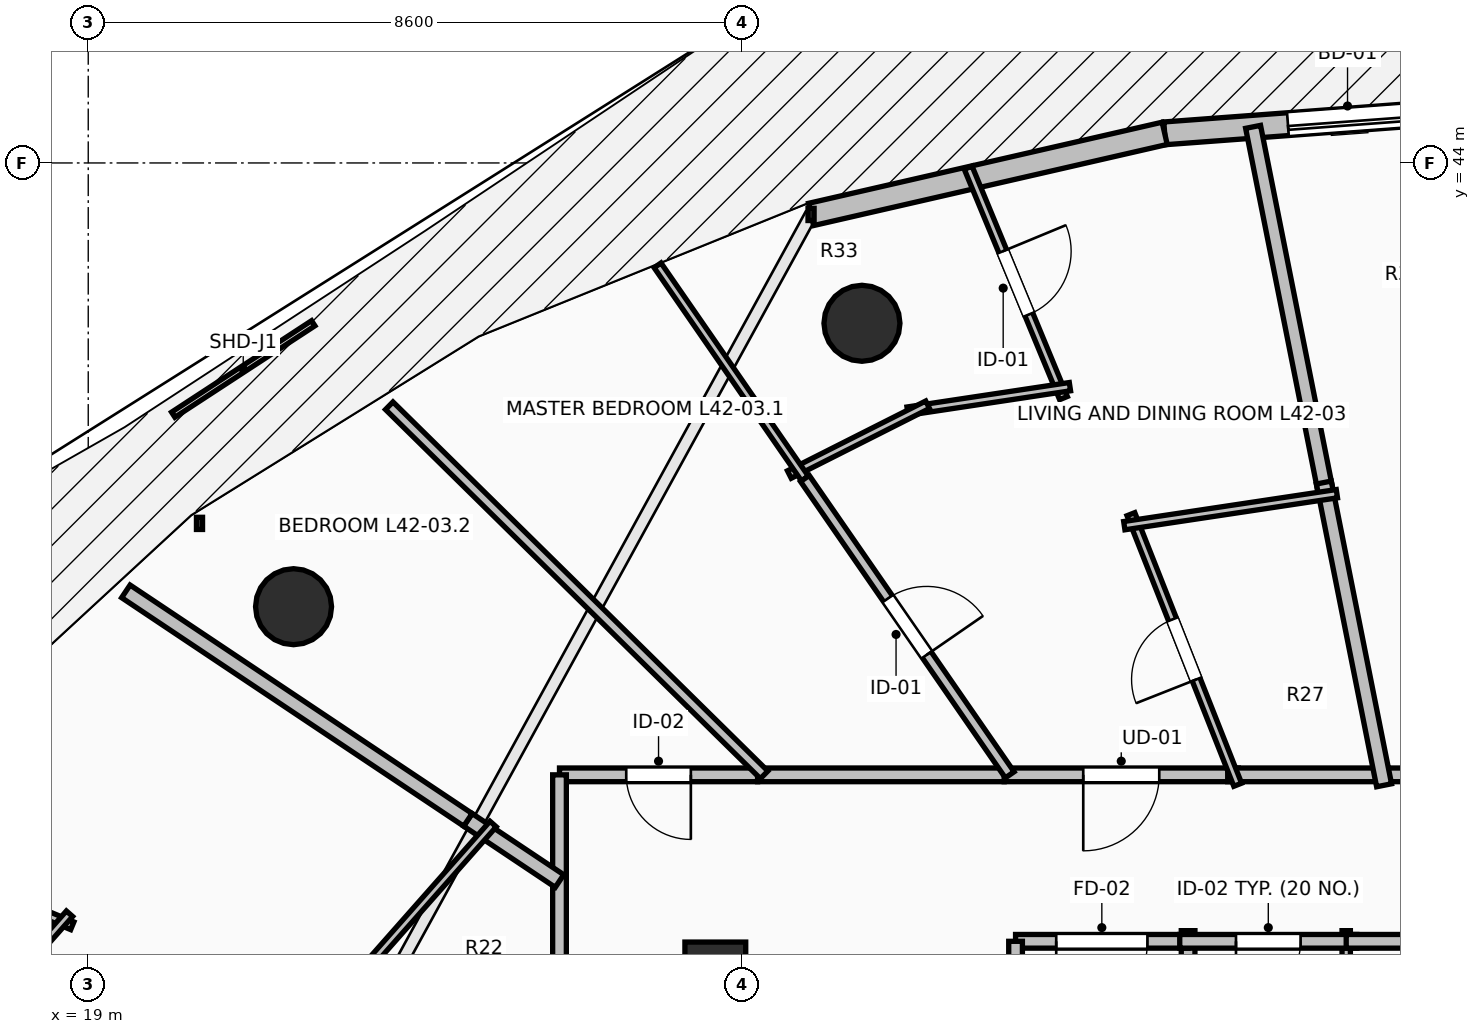
"""IFC4 building model, lengths in metres.
Left out: names, types, materials, properties, quantities, classifications, styles, units other than length and angle.
Written with IfcOpenShell. Run it as: python <this file> out.ifc"""

import sys

from ifc_helpers import new_model, si_unit, direction, frame, frame_2d, origin, origin_2d, place, context, subcontext, project, spatial, rectangle, circle, extrude, element, fill, save


model = new_model("IFC4")
c1 = context("Model", 3, precision=1e-05, world=origin(), true_north=direction((0.0, 1.0)))
c2 = subcontext(c1, "Body", "Model", "MODEL_VIEW")
j1 = project(units=[si_unit("LENGTHUNIT", "METRE"), si_unit("PLANEANGLEUNIT", "RADIAN")], contexts=[c1])
p1 = place(None, origin())
s1 = spatial("IfcSite", under=j1, at=p1, CompositionType="ELEMENT")
p2 = place(p1, origin())
s2 = spatial("IfcBuilding", under=s1, at=p2, CompositionType="ELEMENT")
p3 = place(p2, frame((0.0, 0.0, 157.1)))
s3 = spatial("IfcBuildingStorey", under=s2, at=p3, CompositionType="ELEMENT", Elevation=157.1)
for number, where, z_axis, x_axis in (
    (1, (29.179, 41.891, 0.0), (0.0, 0.0, 1.0), (-0.383, 0.924, 0.0)),
    (2, (21.701, 38.162, 0.0), (0.0, 0.0, 1.0), (-0.707, 0.707, 0.0)),
):
    element("IfcColumn", number, at=place(p3, frame(where, z_axis=z_axis, x_axis=x_axis)), inside=s3, PredefinedType="COLUMN", context=c2, shape_type="SweptSolid", body=[
        extrude(circle(Radius=0.5, at=origin_2d()), origin(), (0.0, 0.0, 1.0), 3.5),
    ])
p4 = place(p3, frame((27.25, 33.15, 0.0), z_axis=(0.0, 0.0, 1.0), x_axis=(1.0, 0.0, 0.0)))
e3 = element("IfcColumn", 3, at=p4, inside=s3, PredefinedType="PILASTER", context=c2, shape_type="SweptSolid", body=[
    extrude(rectangle(XDim=0.8, YDim=1.2, at=origin_2d()), origin(), (0.0, 0.0, 1.0), 3.5),
])
p5 = place(p3, frame((38.0, 44.75, 0.0), z_axis=(0.0, 0.0, 1.0), x_axis=(-0.997237740067, -0.074275768499, 0.0)))
e4 = element("IfcWall", 4, at=p5, inside=s3, PredefinedType="STANDARD", context=c2, shape_type="SweptSolid", body=[
    extrude(rectangle(XDim=4.852, YDim=0.3, at=frame_2d((2.426, 0.0))), origin(), (0.0, 0.0, 1.0), 3.24),
])
p6 = place(p5, frame((1.626, 0.0, 0.0)))
e5 = element("IfcOpeningElement", 5, at=p6, cuts=e4, PredefinedType="OPENING", context=c2, shape_type="SweptSolid", body=[
    extrude(rectangle(XDim=1.6, YDim=2.3, at=frame_2d((0.8, 1.15))), frame((0.0, 0.165, 0.0), z_axis=(0.0, -1.0, 0.0), x_axis=(1.0, 0.0, 0.0)), (0.0, 0.0, 1.0), 0.33),
])
p7 = place(p3, frame((33.162, 44.39, 0.0), z_axis=(0.0, 0.0, 1.0), x_axis=(-0.974698897188, -0.223521944832, 0.0)))
e6 = element("IfcWall", 6, at=p7, inside=s3, PredefinedType="STANDARD", context=c2, shape_type="SweptSolid", body=[
    extrude(rectangle(XDim=4.773, YDim=0.3, at=frame_2d((2.387, 0.0))), origin(), (0.0, 0.0, 1.0), 3.24),
])
p8 = place(p3, frame((33.47, 30.34, 0.0), z_axis=(0.0, 0.0, 1.0), x_axis=(0.0, 1.0, 0.0)))
e7 = element("IfcWall", 7, at=p8, inside=s3, PredefinedType="PARTITIONING", context=c2, shape_type="SweptSolid", body=[
    extrude(rectangle(XDim=3.56, YDim=0.18, at=frame_2d((1.78, 0.0))), origin(), (0.0, 0.0, 1.0), 3.24),
])
p9 = place(p3, frame((33.47, 33.76, 0.0), z_axis=(0.0, 0.0, 1.0), x_axis=(-1.0, 0.0, 0.0)))
e8 = element("IfcWall", 8, at=p9, inside=s3, PredefinedType="PARTITIONING", context=c2, shape_type="SweptSolid", body=[
    extrude(rectangle(XDim=2.27, YDim=0.18, at=frame_2d((1.135, 0.0))), origin(), (0.0, 0.0, 1.0), 3.24),
])
p10 = place(p9, frame((0.535, 0.0, 0.0)))
e9 = element("IfcOpeningElement", 9, at=p10, cuts=e8, PredefinedType="OPENING", context=c2, shape_type="SweptSolid", body=[
    extrude(rectangle(XDim=1.2, YDim=2.15, at=frame_2d((0.6, 1.075))), frame((0.0, 0.105, 0.0), z_axis=(0.0, -1.0, 0.0), x_axis=(1.0, 0.0, 0.0)), (0.0, 0.0, 1.0), 0.21),
])
p11 = place(p3, frame((31.2, 33.76, 0.0), z_axis=(0.0, 0.0, 1.0), x_axis=(0.0, -1.0, 0.0)))
e10 = element("IfcWall", 10, at=p11, inside=s3, PredefinedType="PARTITIONING", context=c2, shape_type="SweptSolid", body=[
    extrude(rectangle(XDim=0.56, YDim=0.18, at=frame_2d((0.28, 0.0))), origin(), (0.0, 0.0, 1.0), 3.24),
])
p12 = place(p3, frame((35.55, 30.34, 0.0), z_axis=(0.0, 0.0, 1.0), x_axis=(0.0, 1.0, 0.0)))
e11 = element("IfcWall", 11, at=p12, inside=s3, PredefinedType="PARTITIONING", context=c2, shape_type="SweptSolid", body=[
    extrude(rectangle(XDim=3.56, YDim=0.11, at=frame_2d((1.78, 0.0))), origin(), (0.0, 0.0, 1.0), 2.432),
])
p13 = place(p3, frame((35.69, 33.76, 0.0), z_axis=(0.0, 0.0, 1.0), x_axis=(-1.0, 0.0, 0.0)))
e12 = element("IfcWall", 12, at=p13, inside=s3, PredefinedType="PARTITIONING", context=c2, shape_type="SweptSolid", body=[
    extrude(rectangle(XDim=2.33, YDim=0.18, at=frame_2d((1.165, 0.0))), origin(), (0.0, 0.0, 1.0), 3.24),
])
p14 = place(p13, frame((0.74, 0.0, 0.0)))
e13 = element("IfcOpeningElement", 13, at=p14, cuts=e12, PredefinedType="OPENING", context=c2, shape_type="SweptSolid", body=[
    extrude(rectangle(XDim=0.85, YDim=2.1, at=frame_2d((0.425, 1.05))), frame((0.0, 0.105, 0.0), z_axis=(0.0, -1.0, 0.0), x_axis=(1.0, 0.0, 0.0)), (0.0, 0.0, 1.0), 0.21),
])
p15 = place(p3, frame((38.29, 33.76, 0.0), z_axis=(0.0, 0.0, 1.0), x_axis=(-1.0, 0.0, 0.0)))
e14 = element("IfcWall", 14, at=p15, inside=s3, PredefinedType="PARTITIONING", context=c2, shape_type="SweptSolid", body=[
    extrude(rectangle(XDim=2.74, YDim=0.18, at=frame_2d((1.37, 0.0))), origin(), (0.0, 0.0, 1.0), 3.24),
])
p16 = place(p15, frame((0.945, 0.0, 0.0)))
e15 = element("IfcOpeningElement", 15, at=p16, cuts=e14, PredefinedType="OPENING", context=c2, shape_type="SweptSolid", body=[
    extrude(rectangle(XDim=0.85, YDim=2.1, at=frame_2d((0.425, 1.05))), frame((0.0, 0.105, 0.0), z_axis=(0.0, -1.0, 0.0), x_axis=(1.0, 0.0, 0.0)), (0.0, 0.0, 1.0), 0.21),
])
p17 = place(p3, frame((37.862, 35.95, 0.0), z_axis=(0.0, 0.0, 1.0), x_axis=(-1.0, 0.0, 0.0)))
e16 = element("IfcWall", 16, at=p17, inside=s3, PredefinedType="PARTITIONING", context=c2, shape_type="SweptSolid", body=[
    extrude(rectangle(XDim=1.902, YDim=0.18, at=frame_2d((0.951, 0.0))), origin(), (0.0, 0.0, 1.0), 2.886),
])
p18 = place(p17, frame((0.526, 0.0, 0.0)))
e17 = element("IfcOpeningElement", 17, at=p18, cuts=e16, PredefinedType="OPENING", context=c2, shape_type="SweptSolid", body=[
    extrude(rectangle(XDim=0.85, YDim=2.1, at=frame_2d((0.425, 1.05))), frame((0.0, 0.105, 0.0), z_axis=(0.0, -1.0, 0.0), x_axis=(1.0, 0.0, 0.0)), (0.0, 0.0, 1.0), 0.21),
])
p19 = place(p3, frame((34.131, 35.95, 0.0), z_axis=(0.0, 0.0, 1.0), x_axis=(-1.0, 0.0, 0.0)))
e18 = element("IfcWall", 18, at=p19, inside=s3, PredefinedType="PARTITIONING", context=c2, shape_type="SweptSolid", body=[
    extrude(rectangle(XDim=3.081, YDim=0.18, at=frame_2d((1.541, 0.0))), origin(), (0.0, 0.0, 1.0), 2.886),
])
p20 = place(p19, frame((1.041, 0.0, 0.0)))
e19 = element("IfcOpeningElement", 19, at=p20, cuts=e18, PredefinedType="OPENING", context=c2, shape_type="SweptSolid", body=[
    extrude(rectangle(XDim=1.0, YDim=2.15, at=frame_2d((0.5, 1.075))), frame((0.0, 0.105, 0.0), z_axis=(0.0, -1.0, 0.0), x_axis=(1.0, 0.0, 0.0)), (0.0, 0.0, 1.0), 0.21),
])
p21 = place(p3, frame((36.1, 35.95, 0.0), z_axis=(0.0, 0.0, 1.0), x_axis=(-1.0, 0.0, 0.0)))
e20 = element("IfcWall", 20, at=p21, inside=s3, PredefinedType="PARTITIONING", context=c2, shape_type="SweptSolid", body=[
    extrude(rectangle(XDim=2.109, YDim=0.18, at=frame_2d((1.055, 0.0))), origin(), (0.0, 0.0, 1.0), 2.886),
])
p22 = place(p3, frame((31.05, 35.95, 0.0), z_axis=(0.0, 0.0, 1.0), x_axis=(-1.0, 0.0, 0.0)))
e21 = element("IfcWall", 21, at=p22, inside=s3, PredefinedType="PARTITIONING", context=c2, shape_type="SweptSolid", body=[
    extrude(rectangle(XDim=3.244, YDim=0.18, at=frame_2d((1.622, 0.0))), origin(), (0.0, 0.0, 1.0), 2.432),
])
p23 = place(p3, frame((27.806, 35.95, 0.0), z_axis=(0.0, 0.0, 1.0), x_axis=(-1.0, 0.0, 0.0)))
e22 = element("IfcWall", 22, at=p23, inside=s3, PredefinedType="PARTITIONING", context=c2, shape_type="SweptSolid", body=[
    extrude(rectangle(XDim=2.606, YDim=0.18, at=frame_2d((1.303, 0.0))), origin(), (0.0, 0.0, 1.0), 2.432),
])
p24 = place(p23, frame((0.878, 0.0, 0.0)))
e23 = element("IfcOpeningElement", 23, at=p24, cuts=e22, PredefinedType="OPENING", context=c2, shape_type="SweptSolid", body=[
    extrude(rectangle(XDim=0.85, YDim=2.1, at=frame_2d((0.425, 1.05))), frame((0.0, 0.105, 0.0), z_axis=(0.0, -1.0, 0.0), x_axis=(1.0, 0.0, 0.0)), (0.0, 0.0, 1.0), 0.21),
])
p25 = place(p3, frame((25.2, 35.95, 0.0), z_axis=(0.0, 0.0, 1.0), x_axis=(0.0, -1.0, 0.0)))
e24 = element("IfcWall", 24, at=p25, inside=s3, PredefinedType="PARTITIONING", context=c2, shape_type="SweptSolid", body=[
    extrude(rectangle(XDim=1.457, YDim=0.18, at=frame_2d((0.729, 0.0))), origin(), (0.0, 0.0, 1.0), 2.432),
])
p26 = place(p3, frame((25.2, 34.633, 0.0), z_axis=(0.0, 0.0, 1.0), x_axis=(0.0, -1.0, 0.0)))
e25 = element("IfcWall", 25, at=p26, inside=s3, PredefinedType="PARTITIONING", context=c2, shape_type="SweptSolid", body=[
    extrude(rectangle(XDim=3.155, YDim=0.18, at=frame_2d((1.578, 0.0))), origin(), (0.0, 0.0, 1.0), 2.432),
])
p27 = place(p3, frame((34.325, 44.475, 0.0), z_axis=(0.0, 0.0, 1.0), x_axis=(0.195054941626, -0.980792317337, 0.0)))
e26 = element("IfcWall", 26, at=p27, inside=s3, PredefinedType="PARTITIONING", context=c2, shape_type="SweptSolid", body=[
    extrude(rectangle(XDim=4.911, YDim=0.2, at=frame_2d((2.456, 0.0))), origin(), (0.0, 0.0, 1.0), 2.432),
])
p28 = place(p3, frame((35.256, 39.795, 0.0), z_axis=(0.0, 0.0, 1.0), x_axis=(0.195214230991, -0.980760625239, 0.0)))
e27 = element("IfcWall", 27, at=p28, inside=s3, PredefinedType="PARTITIONING", context=c2, shape_type="SweptSolid", body=[
    extrude(rectangle(XDim=4.061, YDim=0.2, at=frame_2d((2.03, 0.0))), origin(), (0.0, 0.0, 1.0), 2.886),
])
p29 = place(p3, frame((34.122, 35.82, 0.0), z_axis=(0.0, 0.0, 1.0), x_axis=(-0.36711859649, 0.930174142896, 0.0)))
e28 = element("IfcWall", 28, at=p29, inside=s3, PredefinedType="PARTITIONING", context=c2, shape_type="SweptSolid", body=[
    extrude(rectangle(XDim=3.826, YDim=0.11, at=frame_2d((1.913, 0.0))), origin(), (0.0, 0.0, 1.0), 2.432),
])
p30 = place(p29, frame((1.488, 0.0, 0.0)))
e29 = element("IfcOpeningElement", 29, at=p30, cuts=e28, PredefinedType="OPENING", context=c2, shape_type="SweptSolid", body=[
    extrude(rectangle(XDim=0.85, YDim=2.1, at=frame_2d((0.425, 1.05))), frame((0.0, 0.07, 0.0), z_axis=(0.0, -1.0, 0.0), x_axis=(1.0, 0.0, 0.0)), (0.0, 0.0, 1.0), 0.14),
])
p31 = place(p3, frame((32.631, 39.228, 0.0), z_axis=(0.0, 0.0, 1.0), x_axis=(0.988890718673, 0.148644362566, 0.0)))
e30 = element("IfcWall", 30, at=p31, inside=s3, PredefinedType="PARTITIONING", context=c2, shape_type="SweptSolid", body=[
    extrude(rectangle(XDim=2.828, YDim=0.11, at=frame_2d((1.414, 0.0))), origin(), (0.0, 0.0, 1.0), 2.432),
])
p32 = place(p3, frame((30.576, 43.938, 0.0), z_axis=(0.0, 0.0, 1.0), x_axis=(0.382336453712, -0.924023179451, 0.0)))
e31 = element("IfcWall", 31, at=p32, inside=s3, PredefinedType="PARTITIONING", context=c2, shape_type="SweptSolid", body=[
    extrude(rectangle(XDim=3.28, YDim=0.11, at=frame_2d((1.64, 0.0))), origin(), (0.0, 0.0, 1.0), 2.728),
])
p33 = place(p32, frame((1.19, 0.0, 0.0)))
e32 = element("IfcOpeningElement", 32, at=p33, cuts=e31, PredefinedType="OPENING", context=c2, shape_type="SweptSolid", body=[
    extrude(rectangle(XDim=0.9, YDim=2.1, at=frame_2d((0.45, 1.05))), frame((0.0, 0.07, 0.0), z_axis=(0.0, -1.0, 0.0), x_axis=(1.0, 0.0, 0.0)), (0.0, 0.0, 1.0), 0.14),
])
p34 = place(p3, frame((31.915, 41.057, 0.0), z_axis=(0.0, 0.0, 1.0), x_axis=(-0.98883996758, -0.148981604626, 0.0)))
e33 = element("IfcWall", 33, at=p34, inside=s3, PredefinedType="PARTITIONING", context=c2, shape_type="SweptSolid", body=[
    extrude(rectangle(XDim=2.16, YDim=0.11, at=frame_2d((1.08, 0.0))), origin(), (0.0, 0.0, 1.0), 3.24),
])
p35 = place(p3, frame((30.043, 40.819, 0.0), z_axis=(0.0, 0.0, 1.0), x_axis=(-0.892695055898, -0.450661222179, 0.0)))
e34 = element("IfcWall", 34, at=p35, inside=s3, PredefinedType="PARTITIONING", context=c2, shape_type="SweptSolid", body=[
    extrude(rectangle(XDim=2.038, YDim=0.11, at=frame_2d((1.019, 0.0))), origin(), (0.0, 0.0, 1.0), 2.432),
])
p36 = place(p3, frame((28.429, 39.849, 0.0), z_axis=(0.0, 0.0, 1.0), x_axis=(-0.568554374161, 0.822645685349, 0.0)))
e35 = element("IfcWall", 35, at=p36, inside=s3, PredefinedType="PARTITIONING", context=c2, shape_type="SweptSolid", body=[
    extrude(rectangle(XDim=3.409, YDim=0.11, at=frame_2d((1.705, 0.0))), origin(), (0.0, 0.0, 1.0), 2.728),
])
p37 = place(p3, frame((28.428, 39.849, 0.0), z_axis=(0.0, 0.0, 1.0), x_axis=(0.568542808453, -0.822653678626, 0.0)))
e36 = element("IfcWall", 36, at=p37, inside=s3, PredefinedType="PARTITIONING", context=c2, shape_type="SweptSolid", body=[
    extrude(rectangle(XDim=4.74, YDim=0.14, at=frame_2d((2.37, 0.0))), origin(), (0.0, 0.0, 1.0), 2.432),
])
p38 = place(p37, frame((1.92, 0.0, 0.0)))
e37 = element("IfcOpeningElement", 37, at=p38, cuts=e36, PredefinedType="OPENING", context=c2, shape_type="SweptSolid", body=[
    extrude(rectangle(XDim=0.9, YDim=2.1, at=frame_2d((0.45, 1.05))), frame((0.0, 0.085, 0.0), z_axis=(0.0, -1.0, 0.0), x_axis=(1.0, 0.0, 0.0)), (0.0, 0.0, 1.0), 0.17),
])
p39 = place(p3, frame((22.96, 40.806, 0.0), z_axis=(0.0, 0.0, 1.0), x_axis=(0.712587980465, -0.70158276069, 0.0)))
e38 = element("IfcWall", 38, at=p39, inside=s3, PredefinedType="PARTITIONING", context=c2, shape_type="SweptSolid", body=[
    extrude(rectangle(XDim=6.921, YDim=0.14, at=frame_2d((3.461, 0.0))), origin(), (0.0, 0.0, 1.0), 2.432),
])
p40 = place(p3, frame((23.995, 35.358, 0.0), z_axis=(0.0, 0.0, 1.0), x_axis=(0.831505536539, -0.555516464837, 0.0)))
e39 = element("IfcWall", 39, at=p40, inside=s3, PredefinedType="PARTITIONING", context=c2, shape_type="SweptSolid", body=[
    extrude(rectangle(XDim=1.449, YDim=0.2, at=frame_2d((0.725, 0.0))), origin(), (0.0, 0.0, 1.0), 3.24),
])
p41 = place(p3, frame((19.495, 38.364, 0.0), z_axis=(0.0, 0.0, 1.0), x_axis=(0.831529389247, -0.55548076008, 0.0)))
e40 = element("IfcWall", 40, at=p41, inside=s3, PredefinedType="PARTITIONING", context=c2, shape_type="SweptSolid", body=[
    extrude(rectangle(XDim=5.412, YDim=0.2, at=frame_2d((2.706, 0.0))), origin(), (0.0, 0.0, 1.0), 2.728),
])
p42 = place(p3, frame((22.081, 32.761, 0.0), z_axis=(0.0, 0.0, 1.0), x_axis=(0.662023888113, 0.749482736004, 0.0)))
e41 = element("IfcWall", 41, at=p42, inside=s3, PredefinedType="PARTITIONING", context=c2, shape_type="SweptSolid", body=[
    extrude(rectangle(XDim=3.392, YDim=0.11, at=frame_2d((1.696, 0.0))), origin(), (0.0, 0.0, 1.0), 3.24),
])
p43 = place(p3, frame((16.231, 35.026, 0.0), z_axis=(0.0, 0.0, 1.0), x_axis=(0.923742873908, -0.383013188943, 0.0)))
e42 = element("IfcWall", 42, at=p43, inside=s3, PredefinedType="PARTITIONING", context=c2, shape_type="SweptSolid", body=[
    extrude(rectangle(XDim=2.771, YDim=0.11, at=frame_2d((1.385, 0.0))), origin(), (0.0, 0.0, 1.0), 2.728),
])
p44 = place(p3, frame((18.754, 34.123, 0.0), z_axis=(0.0, 0.0, 1.0), x_axis=(-0.66207590595, -0.749436785033, 0.0)))
e43 = element("IfcWall", 43, at=p44, inside=s3, PredefinedType="PARTITIONING", context=c2, shape_type="SweptSolid", body=[
    extrude(rectangle(XDim=2.328, YDim=0.11, at=frame_2d((1.164, 0.0))), origin(), (0.0, 0.0, 1.0), 2.432),
])
p45 = place(p6, origin())
e44 = element("IfcDoor", 44, at=p45, inside=s3, OperationType="SLIDING_TO_LEFT", PredefinedType="DOOR", context=c2, shape_type="SweptSolid", body=[
    extrude(rectangle(XDim=1.6, YDim=2.3, at=frame_2d((0.8, 1.15))), frame((0.0, 0.025, 0.0), z_axis=(0.0, -1.0, 0.0), x_axis=(1.0, 0.0, 0.0)), (0.0, 0.0, 1.0), 0.05),
])
fill(e5, e44)
p46 = place(p10, origin())
e45 = element("IfcDoor", 45, at=p46, inside=s3, OperationType="SINGLE_SWING_RIGHT", PredefinedType="DOOR", context=c2, shape_type="SweptSolid", body=[
    extrude(rectangle(XDim=1.2, YDim=2.15, at=frame_2d((0.6, 1.075))), frame((0.0, 0.025, 0.0), z_axis=(0.0, -1.0, 0.0), x_axis=(1.0, 0.0, 0.0)), (0.0, 0.0, 1.0), 0.05),
])
fill(e9, e45)
p47 = place(p14, origin())
e46 = element("IfcDoor", 46, at=p47, inside=s3, OperationType="SINGLE_SWING_RIGHT", PredefinedType="DOOR", context=c2, shape_type="SweptSolid", body=[
    extrude(rectangle(XDim=0.85, YDim=2.1, at=frame_2d((0.425, 1.05))), frame((0.0, 0.025, 0.0), z_axis=(0.0, -1.0, 0.0), x_axis=(1.0, 0.0, 0.0)), (0.0, 0.0, 1.0), 0.05),
])
fill(e13, e46)
p48 = place(p20, origin())
e47 = element("IfcDoor", 47, at=p48, inside=s3, OperationType="SINGLE_SWING_RIGHT", PredefinedType="DOOR", context=c2, shape_type="SweptSolid", body=[
    extrude(rectangle(XDim=1.0, YDim=2.15, at=frame_2d((0.5, 1.075))), frame((0.0, 0.025, 0.0), z_axis=(0.0, -1.0, 0.0), x_axis=(1.0, 0.0, 0.0)), (0.0, 0.0, 1.0), 0.05),
])
fill(e19, e47)
p49 = place(p30, origin())
e48 = element("IfcDoor", 48, at=p49, inside=s3, OperationType="SINGLE_SWING_LEFT", PredefinedType="DOOR", context=c2, shape_type="SweptSolid", body=[
    extrude(rectangle(XDim=0.85, YDim=2.1, at=frame_2d((0.425, 1.05))), frame((0.0, 0.025, 0.0), z_axis=(0.0, -1.0, 0.0), x_axis=(1.0, 0.0, 0.0)), (0.0, 0.0, 1.0), 0.05),
])
fill(e29, e48)
p50 = place(p33, origin())
e49 = element("IfcDoor", 49, at=p50, inside=s3, OperationType="SINGLE_SWING_LEFT", PredefinedType="DOOR", context=c2, shape_type="SweptSolid", body=[
    extrude(rectangle(XDim=0.9, YDim=2.1, at=frame_2d((0.45, 1.05))), frame((0.0, 0.025, 0.0), z_axis=(0.0, -1.0, 0.0), x_axis=(1.0, 0.0, 0.0)), (0.0, 0.0, 1.0), 0.05),
])
fill(e32, e49)
p51 = place(p38, origin())
e50 = element("IfcDoor", 50, at=p51, inside=s3, OperationType="SINGLE_SWING_RIGHT", PredefinedType="DOOR", context=c2, shape_type="SweptSolid", body=[
    extrude(rectangle(XDim=0.9, YDim=2.1, at=frame_2d((0.45, 1.05))), frame((0.0, 0.025, 0.0), z_axis=(0.0, -1.0, 0.0), x_axis=(1.0, 0.0, 0.0)), (0.0, 0.0, 1.0), 0.05),
])
fill(e37, e50)
p52 = place(p24, origin())
e51 = element("IfcDoor", 51, at=p52, inside=s3, OperationType="SINGLE_SWING_LEFT", PredefinedType="DOOR", context=c2, shape_type="SweptSolid", body=[
    extrude(rectangle(XDim=0.85, YDim=2.1, at=frame_2d((0.425, 1.05))), frame((0.0, 0.025, 0.0), z_axis=(0.0, -1.0, 0.0), x_axis=(1.0, 0.0, 0.0)), (0.0, 0.0, 1.0), 0.05),
])
fill(e23, e51)
save(model, sys.argv[1])
